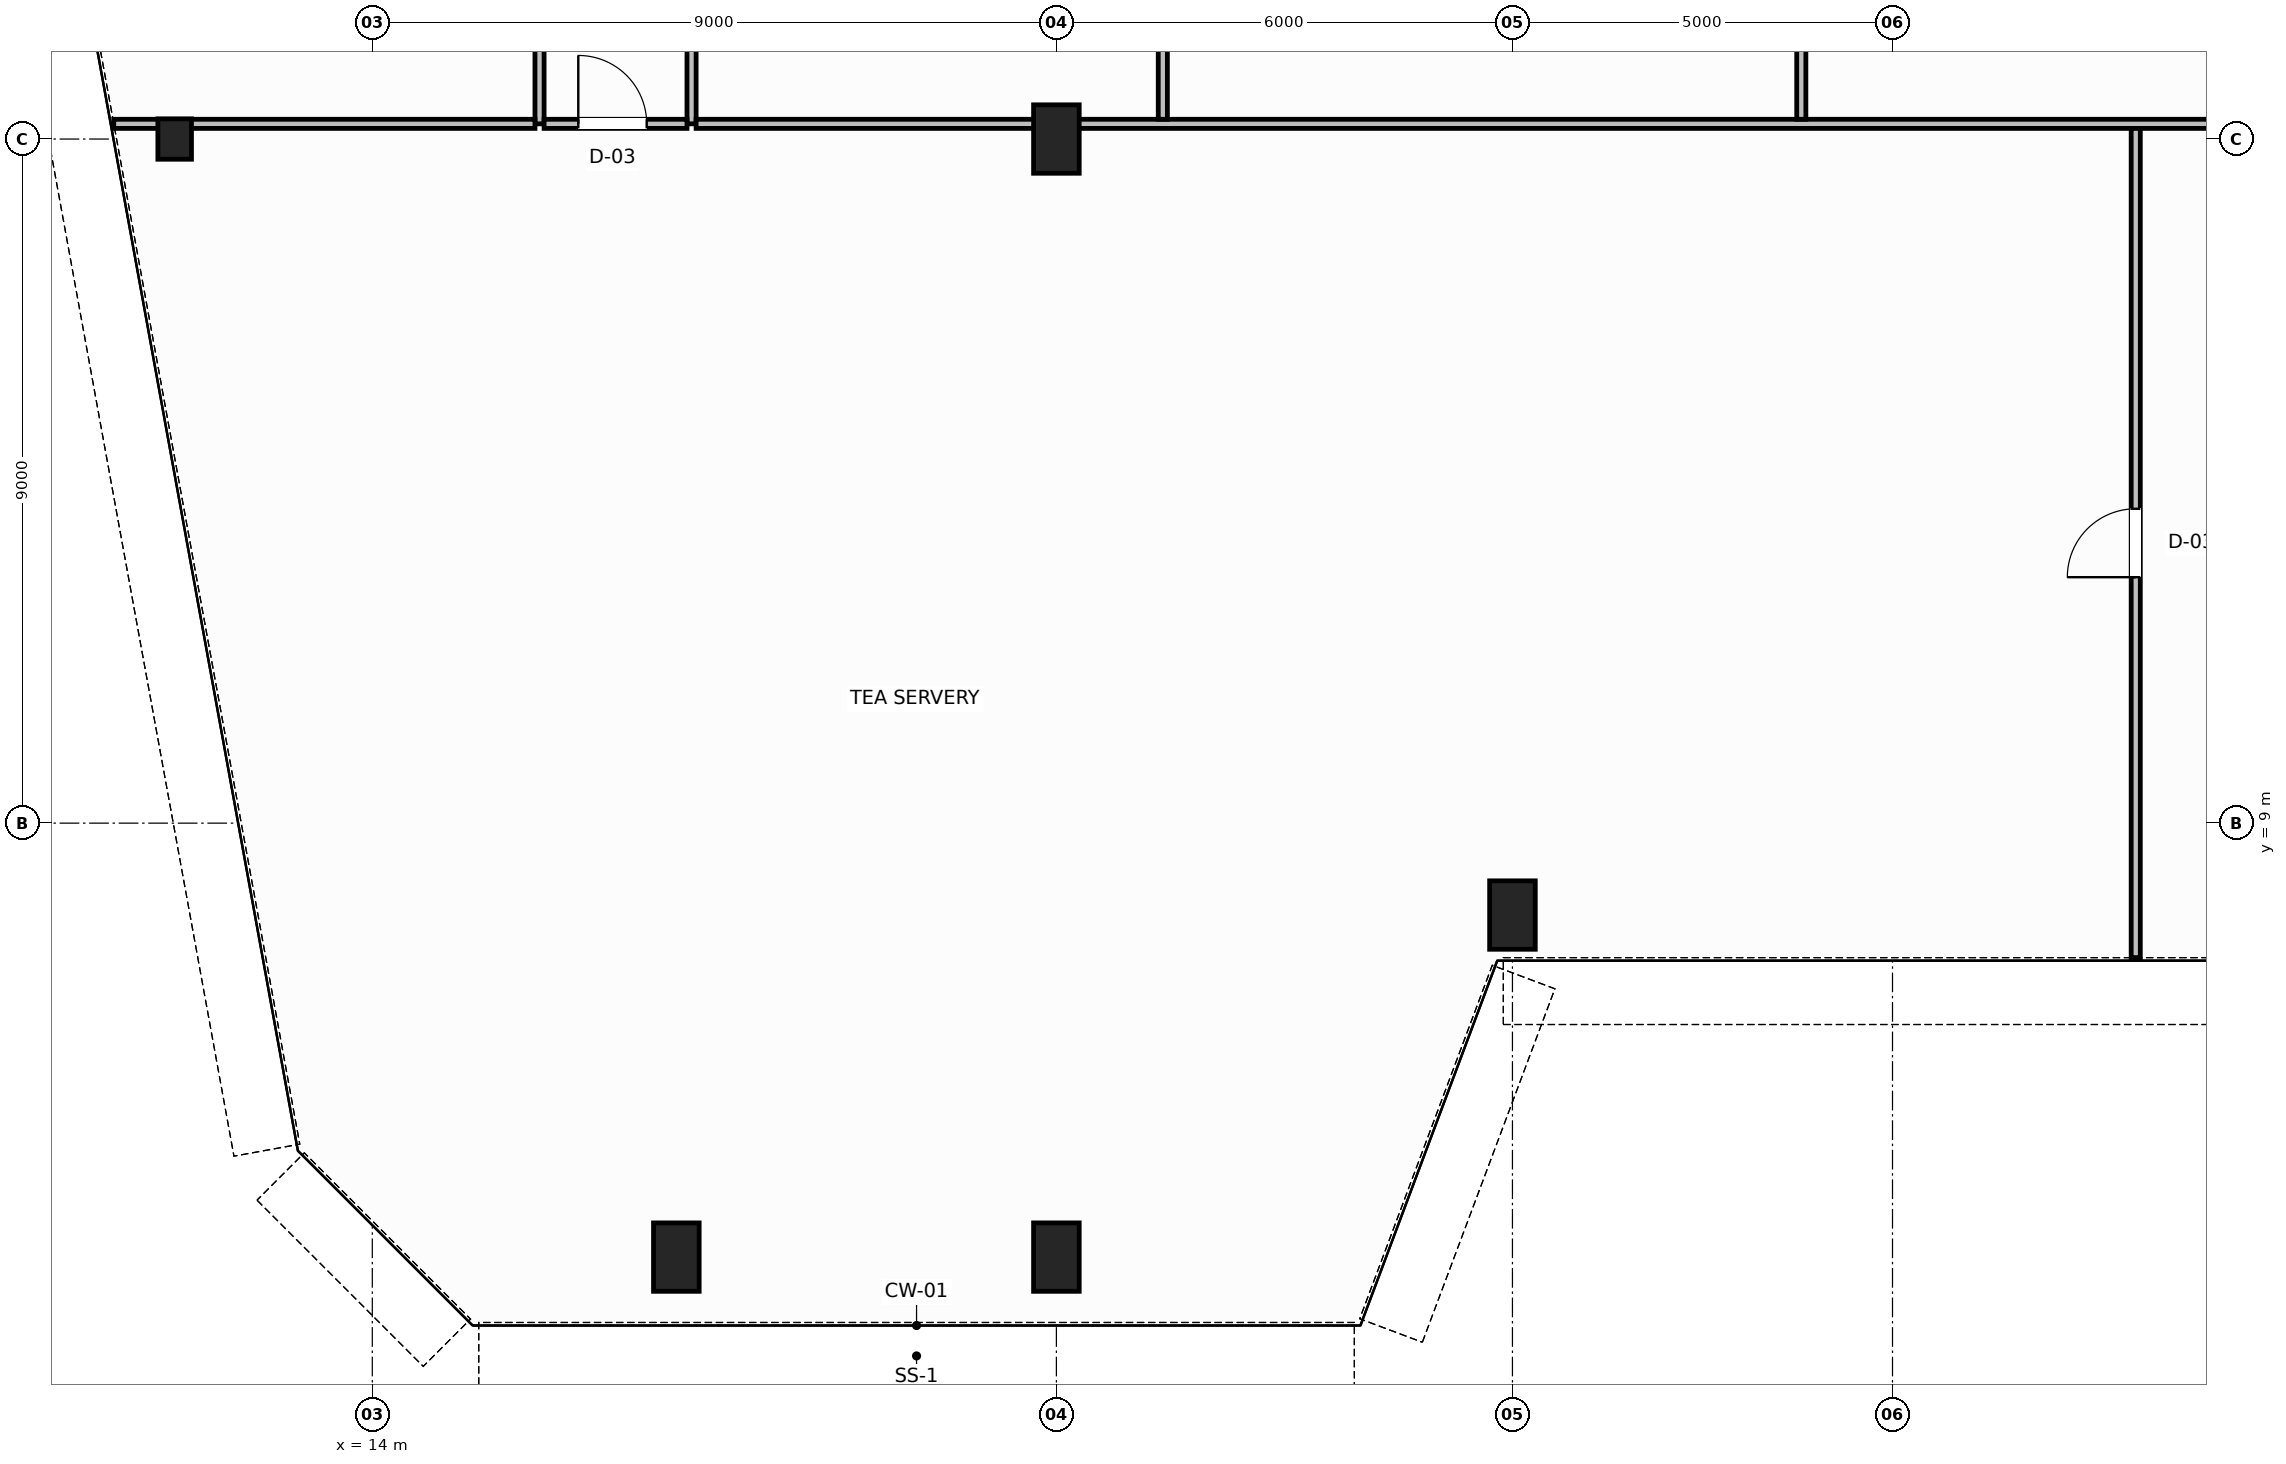
"""IFC4 building model, lengths in metres.
Left out: names, types, materials, properties, quantities, classifications, styles, units other than length and angle.
Written with IfcOpenShell. Run it as: python <this file> out.ifc"""

import sys

from ifc_helpers import new_model, si_unit, direction, frame, frame_2d, origin, origin_2d, place, context, subcontext, project, spatial, rectangle, hollow_rectangle, i_section, extrude, source, transform, mapped, element, fill, save


model = new_model("IFC4")
c1 = context("Model", 3, precision=1e-05, world=origin(), true_north=direction((0.0, 1.0)))
c2 = subcontext(c1, "Body", "Model", "MODEL_VIEW")
j1 = project(units=[si_unit("LENGTHUNIT", "METRE"), si_unit("PLANEANGLEUNIT", "RADIAN")], contexts=[c1])
p1 = place(None, origin())
s1 = spatial("IfcSite", under=j1, at=p1, CompositionType="ELEMENT")
p2 = place(p1, origin())
s2 = spatial("IfcBuilding", under=s1, at=p2, CompositionType="ELEMENT")
p3 = place(p2, frame((0.0, 0.0, 56.8)))
s3 = spatial("IfcBuildingStorey", under=s2, at=p3, CompositionType="ELEMENT", Elevation=56.8)
m1 = source(origin(), c2, "Body", "SweptSolid", [
    extrude(i_section(OverallWidth=0.442, OverallDepth=0.531, WebThickness=0.065, FlangeThickness=0.076, FilletRadius=0.015, at=origin_2d()), origin(), (0.0, 0.0, 1.0), 3.8),
])
p4 = place(p3, frame((11.4, 18.0, 0.0), z_axis=(0.0, 0.0, 1.0), x_axis=(1.0, 0.0, 0.0)))
e1 = element("IfcColumn", 1, at=p4, inside=s3, PredefinedType="COLUMN", context=c2, shape_type="MappedRepresentation", body=[
    mapped(m1, transform((0.0, 0.0, 0.0), scale=1.0)),
])
m2 = source(origin(), c2, "Body", "SweptSolid", [
    extrude(hollow_rectangle(XDim=0.6, YDim=0.9, WallThickness=0.04, InnerFilletRadius=0.04, OuterFilletRadius=0.08, at=origin_2d()), origin(), (0.0, 0.0, 1.0), 3.8),
])
p5 = place(p3, frame((23.0, 18.0, 0.0), z_axis=(0.0, 0.0, 1.0), x_axis=(1.0, 0.0, 0.0)))
e2 = element("IfcColumn", 2, at=p5, inside=s3, PredefinedType="COLUMN", context=c2, shape_type="MappedRepresentation", body=[
    mapped(m2, transform((0.0, 0.0, 0.0), scale=1.0)),
])
m3 = source(origin(), c2, "Body", "SweptSolid", [
    extrude(hollow_rectangle(XDim=0.6, YDim=0.9, WallThickness=0.04, InnerFilletRadius=0.04, OuterFilletRadius=0.08, at=origin_2d()), origin(), (0.0, 0.0, 1.0), 3.744),
])
for number, where, z_axis, x_axis in (
    (3, (18.0, 3.291, 0.032), (0.0, 0.064, 0.998), (-1.0, 0.0, 0.0)),
    (4, (23.0, 3.291, 0.032), (0.0, 0.064, 0.998), (-1.0, 0.0, 0.0)),
    (5, (29.0, 7.791, 0.032), (0.0, 0.064, 0.998), (-1.0, 0.0, 0.0)),
):
    element("IfcColumn", number, at=place(p3, frame(where, z_axis=z_axis, x_axis=x_axis)), inside=s3, PredefinedType="COLUMN", context=c2, shape_type="MappedRepresentation", body=[
        mapped(m3, transform((0.0, 0.0, 0.0), scale=1.0)),
    ])
p6 = place(p3, frame((16.2, 18.2, 0.0), z_axis=(0.0, 0.0, 1.0), x_axis=(0.0, 1.0, 0.0)))
e6 = element("IfcWall", 6, at=p6, inside=s3, PredefinedType="PARTITIONING", context=c2, shape_type="SweptSolid", body=[
    extrude(rectangle(XDim=15.84, YDim=0.12, at=frame_2d((7.92, 0.0))), origin(), (0.0, 0.0, 1.0), 3.58),
])
p7 = place(p6, frame((3.25, 0.0, 0.0)))
e7 = element("IfcOpeningElement", 7, at=p7, cuts=e6, PredefinedType="OPENING", context=c2, shape_type="SweptSolid", body=[
    extrude(rectangle(XDim=0.9, YDim=2.15, at=frame_2d((0.45, 1.075))), frame((0.0, 0.07, 0.0), z_axis=(0.0, -1.0, 0.0), x_axis=(1.0, 0.0, 0.0)), (0.0, 0.0, 1.0), 0.14),
])
p8 = place(p6, frame((11.17, 0.0, 0.0)))
e8 = element("IfcOpeningElement", 8, at=p8, cuts=e6, PredefinedType="OPENING", context=c2, shape_type="SweptSolid", body=[
    extrude(rectangle(XDim=0.9, YDim=2.15, at=frame_2d((0.45, 1.075))), frame((0.0, 0.07, 0.0), z_axis=(0.0, -1.0, 0.0), x_axis=(1.0, 0.0, 0.0)), (0.0, 0.0, 1.0), 0.14),
])
p9 = place(p3, frame((18.2, 18.2, 0.0), z_axis=(0.0, 0.0, 1.0), x_axis=(0.0, 1.0, 0.0)))
e9 = element("IfcWall", 9, at=p9, inside=s3, PredefinedType="PARTITIONING", context=c2, shape_type="SweptSolid", body=[
    extrude(rectangle(XDim=15.84, YDim=0.12, at=frame_2d((7.92, 0.0))), origin(), (0.0, 0.0, 1.0), 3.58),
])
p10 = place(p3, frame((16.26, 18.2, 0.0), z_axis=(0.0, 0.0, 1.0), x_axis=(1.0, 0.0, 0.0)))
e10 = element("IfcWall", 10, at=p10, inside=s3, PredefinedType="PARTITIONING", context=c2, shape_type="SweptSolid", body=[
    extrude(rectangle(XDim=1.88, YDim=0.12, at=frame_2d((0.94, 0.0))), origin(), (0.0, 0.0, 1.0), 2.77),
])
p11 = place(p10, frame((0.45, 0.0, 0.0)))
e11 = element("IfcOpeningElement", 11, at=p11, cuts=e10, PredefinedType="OPENING", context=c2, shape_type="SweptSolid", body=[
    extrude(rectangle(XDim=0.9, YDim=2.15, at=frame_2d((0.45, 1.075))), frame((0.0, 0.07, 0.0), z_axis=(0.0, -1.0, 0.0), x_axis=(1.0, 0.0, 0.0)), (0.0, 0.0, 1.0), 0.14),
])
p12 = place(p3, frame((10.598, 18.2, 0.0), z_axis=(0.0, 0.0, 1.0), x_axis=(1.0, 0.0, 0.0)))
e12 = element("IfcWall", 12, at=p12, inside=s3, PredefinedType="PARTITIONING", context=c2, shape_type="SweptSolid", body=[
    extrude(rectangle(XDim=5.542, YDim=0.12, at=frame_2d((2.771, 0.0))), origin(), (0.0, 0.0, 1.0), 2.77),
])
p13 = place(p3, frame((18.26, 18.2, 0.0), z_axis=(0.0, 0.0, 1.0), x_axis=(1.0, 0.0, 0.0)))
e13 = element("IfcWall", 13, at=p13, inside=s3, PredefinedType="PARTITIONING", context=c2, shape_type="SweptSolid", body=[
    extrude(rectangle(XDim=31.48, YDim=0.12, at=frame_2d((15.74, 0.0))), origin(), (0.0, 0.0, 1.0), 2.77),
])
for number, where, z_axis, x_axis in (
    (14, (24.4, 18.26, 0.0), (0.0, 0.0, 1.0), (0.0, 1.0, 0.0)),
    (15, (32.8, 18.26, 0.0), (0.0, 0.0, 1.0), (0.0, 1.0, 0.0)),
):
    element("IfcWall", number, at=place(p3, frame(where, z_axis=z_axis, x_axis=x_axis)), inside=s3, PredefinedType="PARTITIONING", context=c2, shape_type="SweptSolid", body=[
        extrude(rectangle(XDim=15.78, YDim=0.12, at=frame_2d((7.89, 0.0))), origin(), (0.0, 0.0, 1.0), 3.58),
    ])
p14 = place(p3, frame((37.2, 7.231, 0.0), z_axis=(0.0, 0.0, 1.0), x_axis=(0.0, 1.0, 0.0)))
e16 = element("IfcWall", 16, at=p14, inside=s3, PredefinedType="PARTITIONING", context=c2, shape_type="SweptSolid", body=[
    extrude(rectangle(XDim=10.909, YDim=0.12, at=frame_2d((5.455, 0.0))), origin(), (0.0, 0.0, 1.0), 3.58),
])
p15 = place(p14, frame((5.005, 0.0, 0.0)))
e17 = element("IfcOpeningElement", 17, at=p15, cuts=e16, PredefinedType="OPENING", context=c2, shape_type="SweptSolid", body=[
    extrude(rectangle(XDim=0.9, YDim=2.15, at=frame_2d((0.45, 1.075))), frame((0.0, 0.07, 0.0), z_axis=(0.0, -1.0, 0.0), x_axis=(1.0, 0.0, 0.0)), (0.0, 0.0, 1.0), 0.14),
])
m4 = source(origin(), c2, "Body", "SweptSolid", [
    extrude(rectangle(XDim=0.9, YDim=2.15, at=frame_2d((0.45, 1.075))), frame((0.0, 0.025, 0.0), z_axis=(0.0, -1.0, 0.0), x_axis=(1.0, 0.0, 0.0)), (0.0, 0.0, 1.0), 0.05),
])
p16 = place(p11, origin())
e18 = element("IfcDoor", 18, at=p16, inside=s3, OperationType="SINGLE_SWING_LEFT", PredefinedType="DOOR", context=c2, shape_type="MappedRepresentation", body=[
    mapped(m4, transform((0.0, 0.0, 0.0), scale=1.0)),
])
fill(e11, e18)
p17 = place(p15, origin())
e19 = element("IfcDoor", 19, at=p17, inside=s3, OperationType="SINGLE_SWING_RIGHT", PredefinedType="DOOR", context=c2, shape_type="MappedRepresentation", body=[
    mapped(m4, transform((0.0, 0.0, 0.0), scale=1.0)),
])
fill(e17, e19)
save(model, sys.argv[1])
